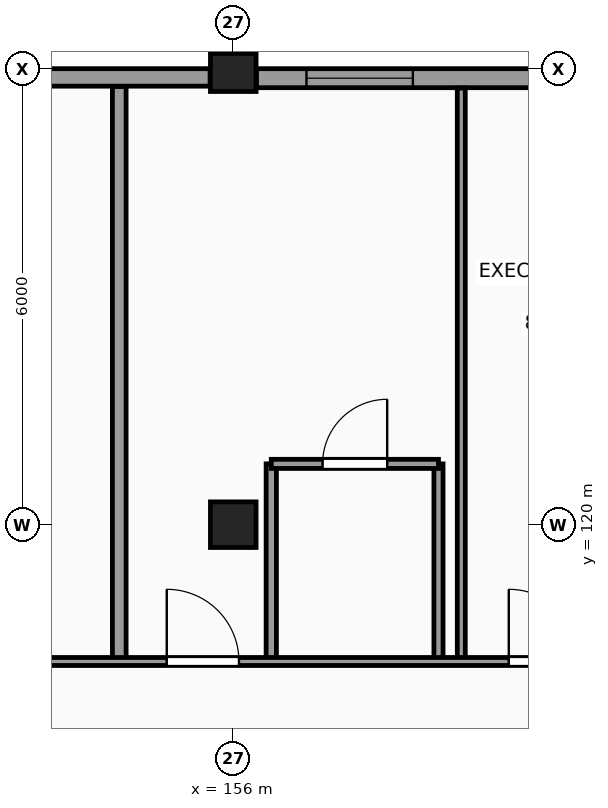
"""IFC4 building model, lengths in metres.
Left out: names, types, materials, properties, quantities, classifications, styles, units other than length and angle.
Written with IfcOpenShell. Run it as: python <this file> out.ifc"""

import sys

from ifc_helpers import new_model, si_unit, direction, frame, frame_2d, origin, origin_2d, place, context, subcontext, project, spatial, rectangle, extrude, element, fill, save


model = new_model("IFC4")
c1 = context("Model", 3, precision=1e-05, world=origin(), true_north=direction((0.0, 1.0)))
c2 = subcontext(c1, "Body", "Model", "MODEL_VIEW")
j1 = project(units=[si_unit("LENGTHUNIT", "METRE"), si_unit("PLANEANGLEUNIT", "RADIAN")], contexts=[c1])
p1 = place(None, origin())
s1 = spatial("IfcSite", under=j1, at=p1, CompositionType="ELEMENT")
p2 = place(p1, origin())
s2 = spatial("IfcBuilding", under=s1, at=p2, CompositionType="ELEMENT")
p3 = place(p2, frame((0.0, 0.0, 28.2)))
s3 = spatial("IfcBuildingStorey", under=s2, at=p3, CompositionType="ELEMENT", Elevation=28.2)
for number, where, z_axis, x_axis in (
    (1, (156.0, 120.0, 0.0), (0.0, 0.0, 1.0), (1.0, 0.0, 0.0)),
    (2, (156.0, 126.0, 0.0), (0.0, 0.0, 1.0), (1.0, 0.0, 0.0)),
):
    element("IfcColumn", number, at=place(p3, frame(where, z_axis=z_axis, x_axis=x_axis)), inside=s3, PredefinedType="COLUMN", context=c2, shape_type="SweptSolid", body=[
        extrude(rectangle(XDim=0.6, YDim=0.6, at=origin_2d()), origin(), (0.0, 0.0, 1.0), 3.3),
    ])
p4 = place(p3, frame((161.72, 125.875, 0.0), z_axis=(0.0, 0.0, 1.0), x_axis=(-1.0, 0.0, 0.0)))
e3 = element("IfcWall", 3, at=p4, inside=s3, PredefinedType="SOLIDWALL", context=c2, shape_type="SweptSolid", body=[
    extrude(rectangle(XDim=5.415, YDim=0.25, at=frame_2d((2.708, 0.0))), origin(), (0.0, 0.0, 1.0), 2.43),
])
p5 = place(p4, frame((3.357, 0.0, 0.8)))
e4 = element("IfcOpeningElement", 4, at=p5, cuts=e3, PredefinedType="OPENING", context=c2, shape_type="SweptSolid", body=[
    extrude(rectangle(XDim=1.4, YDim=1.4, at=frame_2d((0.7, 0.7))), frame((0.0, 0.135, 0.0), z_axis=(0.0, -1.0, 0.0), x_axis=(1.0, 0.0, 0.0)), (0.0, 0.0, 1.0), 0.27),
])
p6 = place(p3, frame((155.695, 125.885, 0.0), z_axis=(0.0, 0.0, 1.0), x_axis=(-1.0, 0.0, 0.0)))
e5 = element("IfcWall", 5, at=p6, inside=s3, PredefinedType="SOLIDWALL", context=c2, shape_type="SweptSolid", body=[
    extrude(rectangle(XDim=5.415, YDim=0.23, at=frame_2d((2.708, 0.0))), origin(), (0.0, 0.0, 1.0), 2.43),
])
p7 = place(p6, frame((2.595, 0.0, 0.8)))
e6 = element("IfcOpeningElement", 6, at=p7, cuts=e5, PredefinedType="OPENING", context=c2, shape_type="SweptSolid", body=[
    extrude(rectangle(XDim=1.4, YDim=1.4, at=frame_2d((0.7, 0.7))), frame((0.0, 0.125, 0.0), z_axis=(0.0, -1.0, 0.0), x_axis=(1.0, 0.0, 0.0)), (0.0, 0.0, 1.0), 0.25),
])
p8 = place(p3, frame((154.5, 118.2, 0.0), z_axis=(0.0, 0.0, 1.0), x_axis=(0.0, 1.0, 0.0)))
e7 = element("IfcWall", 7, at=p8, inside=s3, PredefinedType="PARTITIONING", context=c2, shape_type="SweptSolid", body=[
    extrude(rectangle(XDim=7.565, YDim=0.18, at=frame_2d((3.782, 0.0))), origin(), (0.0, 0.0, 1.0), 3.08),
])
p9 = place(p3, frame((156.5, 118.2, 0.0), z_axis=(0.0, 0.0, 1.0), x_axis=(0.0, 1.0, 0.0)))
e8 = element("IfcWall", 8, at=p9, inside=s3, PredefinedType="PARTITIONING", context=c2, shape_type="SweptSolid", body=[
    extrude(rectangle(XDim=2.6, YDim=0.135, at=frame_2d((1.3, 0.0))), origin(), (0.0, 0.0, 1.0), 3.08),
])
p10 = place(p3, frame((158.7, 118.2, 0.0), z_axis=(0.0, 0.0, 1.0), x_axis=(0.0, 1.0, 0.0)))
e9 = element("IfcWall", 9, at=p10, inside=s3, PredefinedType="PARTITIONING", context=c2, shape_type="SweptSolid", body=[
    extrude(rectangle(XDim=2.6, YDim=0.12, at=frame_2d((1.3, 0.0))), origin(), (0.0, 0.0, 1.0), 3.08),
])
p11 = place(p3, frame((159.0, 118.2, 0.0), z_axis=(0.0, 0.0, 1.0), x_axis=(0.0, 1.0, 0.0)))
e10 = element("IfcWall", 10, at=p11, inside=s3, PredefinedType="PARTITIONING", context=c2, shape_type="SweptSolid", body=[
    extrude(rectangle(XDim=7.545, YDim=0.105, at=frame_2d((3.772, 0.0))), origin(), (0.0, 0.0, 1.0), 3.08),
])
p12 = place(p3, frame((66.235, 118.2, 0.0), z_axis=(0.0, 0.0, 1.0), x_axis=(1.0, 0.0, 0.0)))
e11 = element("IfcWall", 11, at=p12, inside=s3, PredefinedType="PARTITIONING", context=c2, shape_type="SweptSolid", body=[
    extrude(rectangle(XDim=110.265, YDim=0.105, at=frame_2d((55.132, 0.0))), origin(), (0.0, 0.0, 1.0), 3.08),
])
p13 = place(p12, frame((0.49, 0.0, 0.0)))
e12 = element("IfcOpeningElement", 12, at=p13, cuts=e11, PredefinedType="OPENING", context=c2, shape_type="SweptSolid", body=[
    extrude(rectangle(XDim=0.95, YDim=2.1, at=frame_2d((0.475, 1.05))), frame((0.0, 0.062, 0.0), z_axis=(0.0, -1.0, 0.0), x_axis=(1.0, 0.0, 0.0)), (0.0, 0.0, 1.0), 0.125),
])
p14 = place(p12, frame((4.89, 0.0, 0.0)))
e13 = element("IfcOpeningElement", 13, at=p14, cuts=e11, PredefinedType="OPENING", context=c2, shape_type="SweptSolid", body=[
    extrude(rectangle(XDim=0.95, YDim=2.1, at=frame_2d((0.475, 1.05))), frame((0.0, 0.062, 0.0), z_axis=(0.0, -1.0, 0.0), x_axis=(1.0, 0.0, 0.0)), (0.0, 0.0, 1.0), 0.125),
])
p15 = place(p12, frame((9.39, 0.0, 0.0)))
e14 = element("IfcOpeningElement", 14, at=p15, cuts=e11, PredefinedType="OPENING", context=c2, shape_type="SweptSolid", body=[
    extrude(rectangle(XDim=0.95, YDim=2.1, at=frame_2d((0.475, 1.05))), frame((0.0, 0.062, 0.0), z_axis=(0.0, -1.0, 0.0), x_axis=(1.0, 0.0, 0.0)), (0.0, 0.0, 1.0), 0.125),
])
p16 = place(p12, frame((24.09, 0.0, 0.0)))
e15 = element("IfcOpeningElement", 15, at=p16, cuts=e11, PredefinedType="OPENING", context=c2, shape_type="SweptSolid", body=[
    extrude(rectangle(XDim=0.95, YDim=2.1, at=frame_2d((0.475, 1.05))), frame((0.0, 0.062, 0.0), z_axis=(0.0, -1.0, 0.0), x_axis=(1.0, 0.0, 0.0)), (0.0, 0.0, 1.0), 0.125),
])
p17 = place(p12, frame((32.34, 0.0, 0.0)))
e16 = element("IfcOpeningElement", 16, at=p17, cuts=e11, PredefinedType="OPENING", context=c2, shape_type="SweptSolid", body=[
    extrude(rectangle(XDim=0.95, YDim=2.1, at=frame_2d((0.475, 1.05))), frame((0.0, 0.062, 0.0), z_axis=(0.0, -1.0, 0.0), x_axis=(1.0, 0.0, 0.0)), (0.0, 0.0, 1.0), 0.125),
])
p18 = place(p12, frame((34.89, 0.0, 0.0)))
e17 = element("IfcOpeningElement", 17, at=p18, cuts=e11, PredefinedType="OPENING", context=c2, shape_type="SweptSolid", body=[
    extrude(rectangle(XDim=0.95, YDim=2.1, at=frame_2d((0.475, 1.05))), frame((0.0, 0.062, 0.0), z_axis=(0.0, -1.0, 0.0), x_axis=(1.0, 0.0, 0.0)), (0.0, 0.0, 1.0), 0.125),
])
p19 = place(p12, frame((42.09, 0.0, 0.0)))
e18 = element("IfcOpeningElement", 18, at=p19, cuts=e11, PredefinedType="OPENING", context=c2, shape_type="SweptSolid", body=[
    extrude(rectangle(XDim=0.95, YDim=2.1, at=frame_2d((0.475, 1.05))), frame((0.0, 0.062, 0.0), z_axis=(0.0, -1.0, 0.0), x_axis=(1.0, 0.0, 0.0)), (0.0, 0.0, 1.0), 0.125),
])
p20 = place(p12, frame((46.29, 0.0, 0.0)))
e19 = element("IfcOpeningElement", 19, at=p20, cuts=e11, PredefinedType="OPENING", context=c2, shape_type="SweptSolid", body=[
    extrude(rectangle(XDim=0.95, YDim=2.1, at=frame_2d((0.475, 1.05))), frame((0.0, 0.062, 0.0), z_axis=(0.0, -1.0, 0.0), x_axis=(1.0, 0.0, 0.0)), (0.0, 0.0, 1.0), 0.125),
])
p21 = place(p12, frame((48.49, 0.0, 0.0)))
e20 = element("IfcOpeningElement", 20, at=p21, cuts=e11, PredefinedType="OPENING", context=c2, shape_type="SweptSolid", body=[
    extrude(rectangle(XDim=0.95, YDim=2.1, at=frame_2d((0.475, 1.05))), frame((0.0, 0.062, 0.0), z_axis=(0.0, -1.0, 0.0), x_axis=(1.0, 0.0, 0.0)), (0.0, 0.0, 1.0), 0.125),
])
p22 = place(p12, frame((54.49, 0.0, 0.0)))
e21 = element("IfcOpeningElement", 21, at=p22, cuts=e11, PredefinedType="OPENING", context=c2, shape_type="SweptSolid", body=[
    extrude(rectangle(XDim=0.95, YDim=2.1, at=frame_2d((0.475, 1.05))), frame((0.0, 0.062, 0.0), z_axis=(0.0, -1.0, 0.0), x_axis=(1.0, 0.0, 0.0)), (0.0, 0.0, 1.0), 0.125),
])
p23 = place(p12, frame((64.29, 0.0, 0.0)))
e22 = element("IfcOpeningElement", 22, at=p23, cuts=e11, PredefinedType="OPENING", context=c2, shape_type="SweptSolid", body=[
    extrude(rectangle(XDim=0.95, YDim=2.1, at=frame_2d((0.475, 1.05))), frame((0.0, 0.062, 0.0), z_axis=(0.0, -1.0, 0.0), x_axis=(1.0, 0.0, 0.0)), (0.0, 0.0, 1.0), 0.125),
])
p24 = place(p12, frame((66.49, 0.0, 0.0)))
e23 = element("IfcOpeningElement", 23, at=p24, cuts=e11, PredefinedType="OPENING", context=c2, shape_type="SweptSolid", body=[
    extrude(rectangle(XDim=0.95, YDim=2.1, at=frame_2d((0.475, 1.05))), frame((0.0, 0.062, 0.0), z_axis=(0.0, -1.0, 0.0), x_axis=(1.0, 0.0, 0.0)), (0.0, 0.0, 1.0), 0.125),
])
p25 = place(p12, frame((70.89, 0.0, 0.0)))
e24 = element("IfcOpeningElement", 24, at=p25, cuts=e11, PredefinedType="OPENING", context=c2, shape_type="SweptSolid", body=[
    extrude(rectangle(XDim=0.95, YDim=2.1, at=frame_2d((0.475, 1.05))), frame((0.0, 0.062, 0.0), z_axis=(0.0, -1.0, 0.0), x_axis=(1.0, 0.0, 0.0)), (0.0, 0.0, 1.0), 0.125),
])
p26 = place(p12, frame((78.09, 0.0, 0.0)))
e25 = element("IfcOpeningElement", 25, at=p26, cuts=e11, PredefinedType="OPENING", context=c2, shape_type="SweptSolid", body=[
    extrude(rectangle(XDim=0.95, YDim=2.1, at=frame_2d((0.475, 1.05))), frame((0.0, 0.062, 0.0), z_axis=(0.0, -1.0, 0.0), x_axis=(1.0, 0.0, 0.0)), (0.0, 0.0, 1.0), 0.125),
])
p27 = place(p12, frame((86.34, 0.0, 0.0)))
e26 = element("IfcOpeningElement", 26, at=p27, cuts=e11, PredefinedType="OPENING", context=c2, shape_type="SweptSolid", body=[
    extrude(rectangle(XDim=0.95, YDim=2.1, at=frame_2d((0.475, 1.05))), frame((0.0, 0.062, 0.0), z_axis=(0.0, -1.0, 0.0), x_axis=(1.0, 0.0, 0.0)), (0.0, 0.0, 1.0), 0.125),
])
p28 = place(p12, frame((88.89, 0.0, 0.0)))
e27 = element("IfcOpeningElement", 27, at=p28, cuts=e11, PredefinedType="OPENING", context=c2, shape_type="SweptSolid", body=[
    extrude(rectangle(XDim=0.95, YDim=2.1, at=frame_2d((0.475, 1.05))), frame((0.0, 0.062, 0.0), z_axis=(0.0, -1.0, 0.0), x_axis=(1.0, 0.0, 0.0)), (0.0, 0.0, 1.0), 0.125),
])
p29 = place(p12, frame((93.39, 0.0, 0.0)))
e28 = element("IfcOpeningElement", 28, at=p29, cuts=e11, PredefinedType="OPENING", context=c2, shape_type="SweptSolid", body=[
    extrude(rectangle(XDim=0.95, YDim=2.1, at=frame_2d((0.475, 1.05))), frame((0.0, 0.062, 0.0), z_axis=(0.0, -1.0, 0.0), x_axis=(1.0, 0.0, 0.0)), (0.0, 0.0, 1.0), 0.125),
])
p30 = place(p12, frame((104.99, 0.0, 0.0)))
e29 = element("IfcOpeningElement", 29, at=p30, cuts=e11, PredefinedType="OPENING", context=c2, shape_type="SweptSolid", body=[
    extrude(rectangle(XDim=0.95, YDim=2.1, at=frame_2d((0.475, 1.05))), frame((0.0, 0.062, 0.0), z_axis=(0.0, -1.0, 0.0), x_axis=(1.0, 0.0, 0.0)), (0.0, 0.0, 1.0), 0.125),
])
p31 = place(p3, frame((156.5, 120.8, 0.0), z_axis=(0.0, 0.0, 1.0), x_axis=(1.0, 0.0, 0.0)))
e30 = element("IfcWall", 30, at=p31, inside=s3, PredefinedType="PARTITIONING", context=c2, shape_type="SweptSolid", body=[
    extrude(rectangle(XDim=2.2, YDim=0.12, at=frame_2d((1.1, 0.0))), origin(), (0.0, 0.0, 1.0), 3.08),
])
p32 = place(p31, frame((0.675, 0.0, 0.0)))
e31 = element("IfcOpeningElement", 31, at=p32, cuts=e30, PredefinedType="OPENING", context=c2, shape_type="SweptSolid", body=[
    extrude(rectangle(XDim=0.85, YDim=2.1, at=frame_2d((0.425, 1.05))), frame((0.0, 0.07, 0.0), z_axis=(0.0, -1.0, 0.0), x_axis=(1.0, 0.0, 0.0)), (0.0, 0.0, 1.0), 0.14),
])
p33 = place(p5, origin())
e32 = element("IfcWindow", 32, at=p33, inside=s3, PartitioningType="SINGLE_PANEL", PredefinedType="WINDOW", context=c2, shape_type="SweptSolid", body=[
    extrude(rectangle(XDim=1.4, YDim=1.4, at=frame_2d((0.7, 0.7))), frame((0.0, 0.03, 0.0), z_axis=(0.0, -1.0, 0.0), x_axis=(1.0, 0.0, 0.0)), (0.0, 0.0, 1.0), 0.06),
])
fill(e4, e32)
p34 = place(p32, origin())
e33 = element("IfcDoor", 33, at=p34, inside=s3, OperationType="SINGLE_SWING_RIGHT", PredefinedType="DOOR", context=c2, shape_type="SweptSolid", body=[
    extrude(rectangle(XDim=0.85, YDim=2.1, at=frame_2d((0.425, 1.05))), frame((0.0, 0.025, 0.0), z_axis=(0.0, -1.0, 0.0), x_axis=(1.0, 0.0, 0.0)), (0.0, 0.0, 1.0), 0.05),
])
fill(e31, e33)
p35 = place(p28, origin())
e34 = element("IfcDoor", 34, at=p35, inside=s3, OperationType="SINGLE_SWING_LEFT", PredefinedType="DOOR", context=c2, shape_type="SweptSolid", body=[
    extrude(rectangle(XDim=0.95, YDim=2.1, at=frame_2d((0.475, 1.05))), frame((0.0, 0.025, 0.0), z_axis=(0.0, -1.0, 0.0), x_axis=(1.0, 0.0, 0.0)), (0.0, 0.0, 1.0), 0.05),
])
fill(e27, e34)
p36 = place(p29, origin())
e35 = element("IfcDoor", 35, at=p36, inside=s3, OperationType="SINGLE_SWING_LEFT", PredefinedType="DOOR", context=c2, shape_type="SweptSolid", body=[
    extrude(rectangle(XDim=0.95, YDim=2.1, at=frame_2d((0.475, 1.05))), frame((0.0, 0.025, 0.0), z_axis=(0.0, -1.0, 0.0), x_axis=(1.0, 0.0, 0.0)), (0.0, 0.0, 1.0), 0.05),
])
fill(e28, e35)
save(model, sys.argv[1])
